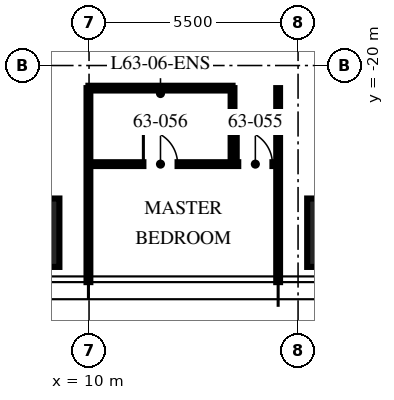
"""IFC4 building model, lengths in metres.
Left out: names, types, materials, properties, quantities, classifications, styles, units other than length and angle.
Written with IfcOpenShell. Run it as: python <this file> out.ifc"""

import sys

from ifc_helpers import new_model, si_unit, direction, frame, frame_2d, origin, origin_2d, place, context, subcontext, project, spatial, rectangle, extrude, element, fill, save


model = new_model("IFC4")
c1 = context("Model", 3, precision=1e-05, world=origin(), true_north=direction((0.0, 1.0)))
c2 = subcontext(c1, "Body", "Model", "MODEL_VIEW")
j1 = project(units=[si_unit("LENGTHUNIT", "METRE"), si_unit("PLANEANGLEUNIT", "RADIAN")], contexts=[c1])
p1 = place(None, origin())
s1 = spatial("IfcSite", under=j1, at=p1, CompositionType="ELEMENT")
p2 = place(p1, origin())
s2 = spatial("IfcBuilding", under=s1, at=p2, CompositionType="ELEMENT")
p3 = place(p2, frame((0.0, 0.0, 252.0)))
s3 = spatial("IfcBuildingStorey", under=s2, at=p3, CompositionType="ELEMENT", Elevation=252.0)
for number, where, z_axis, x_axis in (
    (1, (16.64, -24.4, 0.0), (0.0, 0.0, 1.0), (1.0, 0.0, 0.0)),
    (2, (8.32, -24.4, 0.0), (0.0, 0.0, 1.0), (1.0, 0.0, 0.0)),
):
    element("IfcColumn", number, at=place(p3, frame(where, z_axis=z_axis, x_axis=x_axis)), inside=s3, PredefinedType="COLUMN", context=c2, shape_type="SweptSolid", body=[
        extrude(rectangle(XDim=1.8, YDim=1.8, at=origin_2d()), origin(), (0.0, 0.0, 1.0), 3.75),
    ])
for number, where, z_axis, x_axis in (
    (3, (9.984, -20.595, 0.0), (0.0, 0.0, 1.0), (0.0, -1.0, 0.0)),
    (4, (14.976, -20.595, 0.0), (0.0, 0.0, 1.0), (0.0, -1.0, 0.0)),
):
    element("IfcWall", number, at=place(p3, frame(where, z_axis=z_axis, x_axis=x_axis)), inside=s3, PredefinedType="PARTITIONING", context=c2, shape_type="SweptSolid", body=[
        extrude(rectangle(XDim=5.105, YDim=0.1, at=frame_2d((2.552, 0.0))), origin(), (0.0, 0.0, 1.0), 2.91),
    ])
p4 = place(p3, frame((9.984, -22.595, 0.0), z_axis=(0.0, 0.0, 1.0), x_axis=(1.0, 0.0, 0.0)))
e5 = element("IfcWall", 5, at=p4, inside=s3, PredefinedType="PARTITIONING", context=c2, shape_type="SweptSolid", body=[
    extrude(rectangle(XDim=4.992, YDim=0.1, at=frame_2d((2.496, 0.0))), origin(), (0.0, 0.0, 1.0), 2.81),
])
p5 = place(p4, frame((3.942, 0.0, 0.0)))
e6 = element("IfcOpeningElement", 6, at=p5, cuts=e5, PredefinedType="OPENING", context=c2, shape_type="SweptSolid", body=[
    extrude(rectangle(XDim=0.9, YDim=2.1, at=frame_2d((0.45, 1.05))), frame((0.0, 0.06, 0.0), z_axis=(0.0, -1.0, 0.0), x_axis=(1.0, 0.0, 0.0)), (0.0, 0.0, 1.0), 0.12),
])
p6 = place(p4, frame((1.446, 0.0, 0.0)))
e7 = element("IfcOpeningElement", 7, at=p6, cuts=e5, PredefinedType="OPENING", context=c2, shape_type="SweptSolid", body=[
    extrude(rectangle(XDim=0.9, YDim=2.1, at=frame_2d((0.45, 1.05))), frame((0.0, 0.06, 0.0), z_axis=(0.0, -1.0, 0.0), x_axis=(1.0, 0.0, 0.0)), (0.0, 0.0, 1.0), 0.12),
])
p7 = place(p3, frame((13.776, -20.595, 0.0), z_axis=(0.0, 0.0, 1.0), x_axis=(0.0, -1.0, 0.0)))
e8 = element("IfcWall", 8, at=p7, inside=s3, PredefinedType="PARTITIONING", context=c2, shape_type="SweptSolid", body=[
    extrude(rectangle(XDim=2.0, YDim=0.1, at=frame_2d((1.0, 0.0))), origin(), (0.0, 0.0, 1.0), 3.5),
])
p8 = place(p3, frame((9.984, -20.595, 0.0), z_axis=(0.0, 0.0, 1.0), x_axis=(1.0, 0.0, 0.0)))
e9 = element("IfcWall", 9, at=p8, inside=s3, PredefinedType="PARTITIONING", context=c2, shape_type="SweptSolid", body=[
    extrude(rectangle(XDim=3.792, YDim=0.125, at=frame_2d((1.896, 0.0))), origin(), (0.0, 0.0, 1.0), 2.81),
])
p9 = place(p5, origin())
e10 = element("IfcDoor", 10, at=p9, inside=s3, OperationType="SINGLE_SWING_LEFT", PredefinedType="DOOR", context=c2, shape_type="SweptSolid", body=[
    extrude(rectangle(XDim=0.9, YDim=2.1, at=frame_2d((0.45, 1.05))), frame((0.0, 0.025, 0.0), z_axis=(0.0, -1.0, 0.0), x_axis=(1.0, 0.0, 0.0)), (0.0, 0.0, 1.0), 0.05),
])
fill(e6, e10)
p10 = place(p6, origin())
e11 = element("IfcDoor", 11, at=p10, inside=s3, OperationType="SINGLE_SWING_LEFT", PredefinedType="DOOR", context=c2, shape_type="SweptSolid", body=[
    extrude(rectangle(XDim=0.9, YDim=2.1, at=frame_2d((0.45, 1.05))), frame((0.0, 0.025, 0.0), z_axis=(0.0, -1.0, 0.0), x_axis=(1.0, 0.0, 0.0)), (0.0, 0.0, 1.0), 0.05),
])
fill(e7, e11)
save(model, sys.argv[1])
